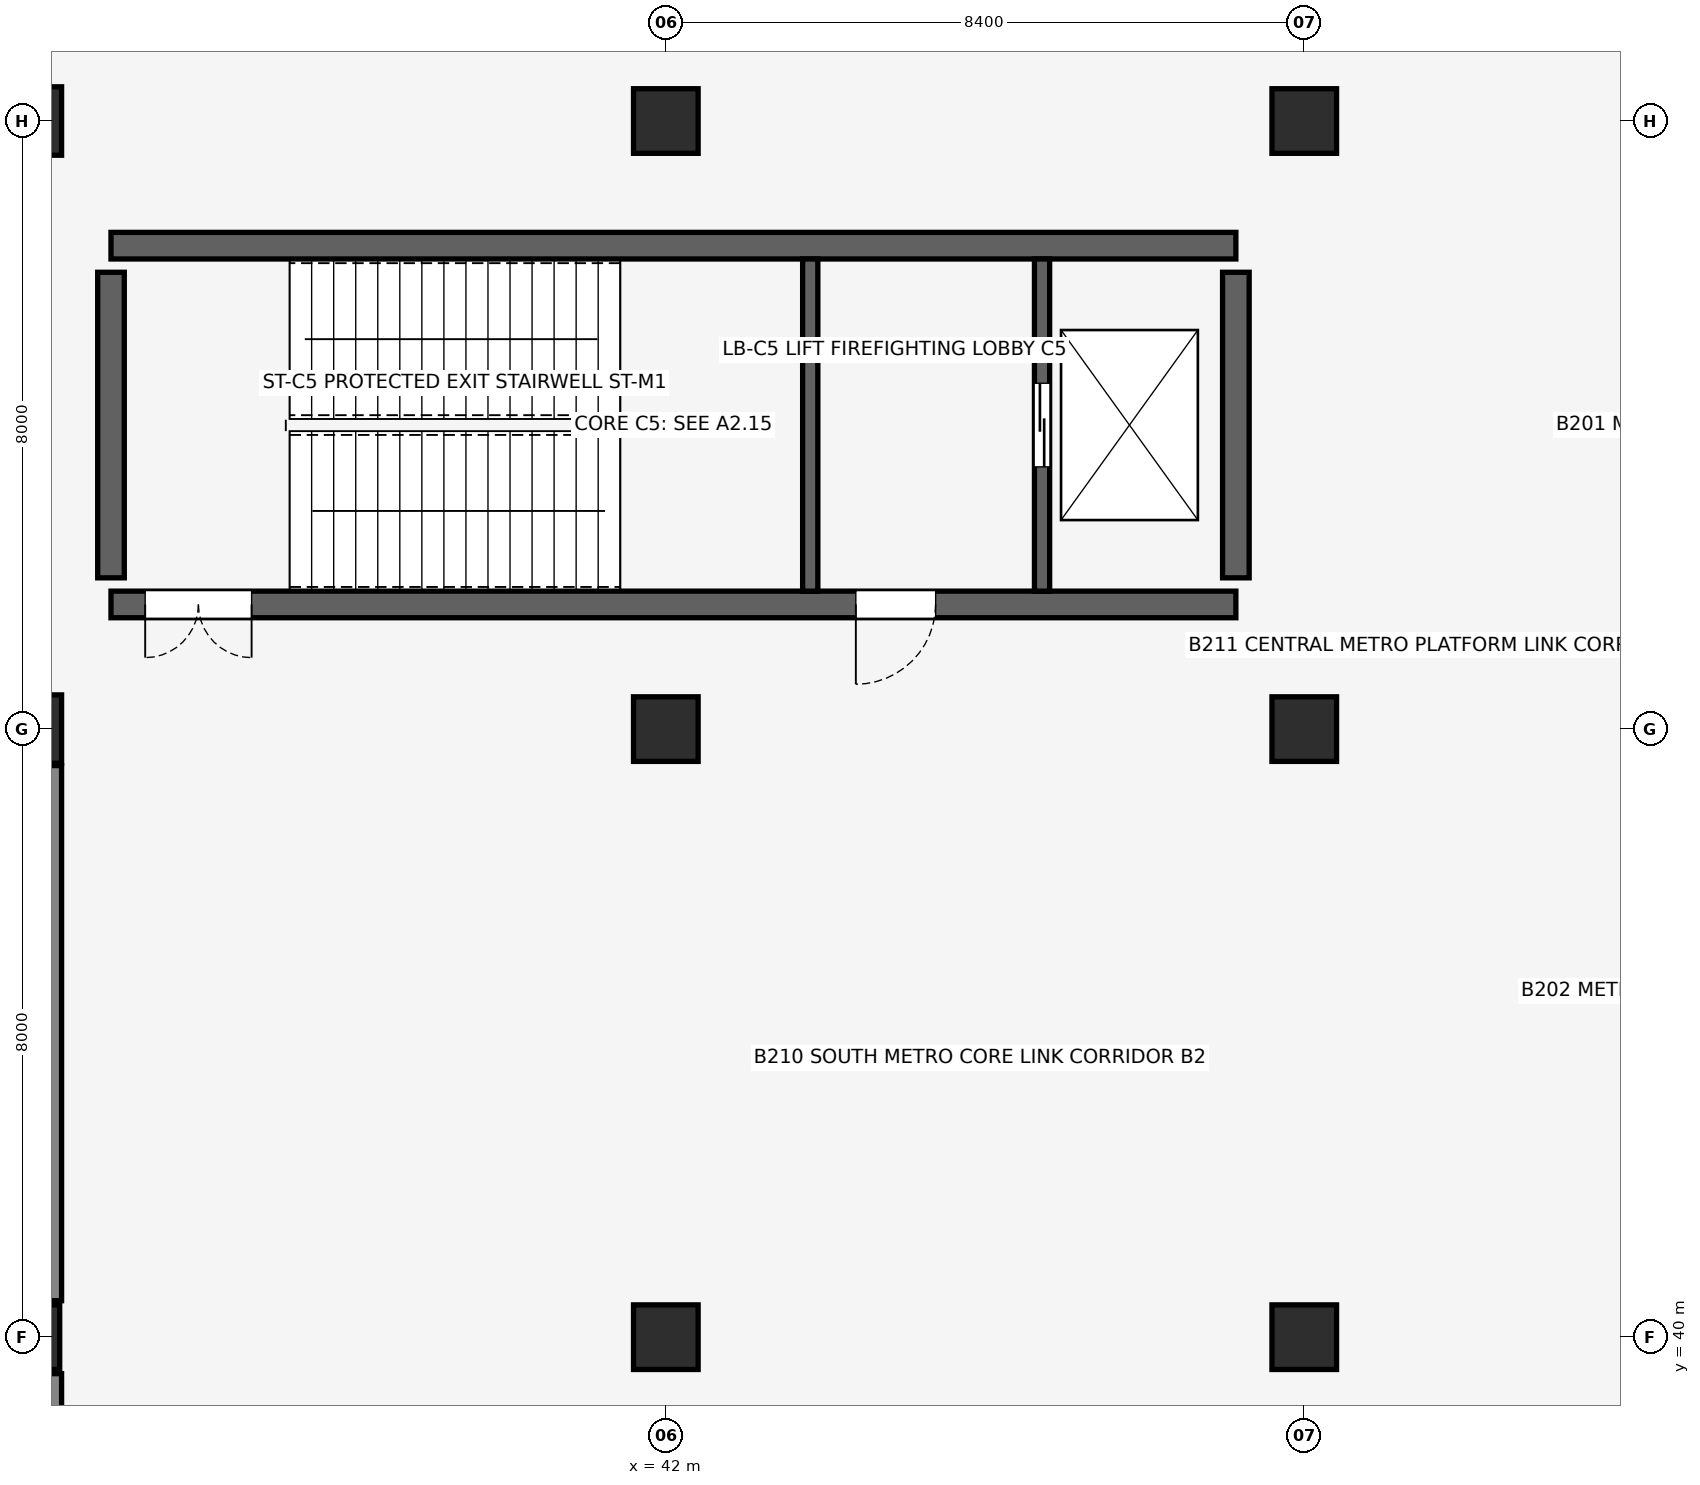
"""IFC4 building model, lengths in metres.
Left out: names, types, materials, properties, quantities, classifications, styles, units other than length and angle.
Written with IfcOpenShell. Run it as: python <this file> out.ifc"""

import sys

from ifc_helpers import new_model, si_unit, direction, frame, frame_2d, origin, origin_2d, place, context, subcontext, project, spatial, rectangle, extrude, element, fill, save


model = new_model("IFC4")
c1 = context("Model", 3, precision=1e-05, world=origin(), true_north=direction((0.0, 1.0)))
c2 = subcontext(c1, "Body", "Model", "MODEL_VIEW")
j1 = project(units=[si_unit("LENGTHUNIT", "METRE"), si_unit("PLANEANGLEUNIT", "RADIAN")], contexts=[c1])
p1 = place(None, origin())
s1 = spatial("IfcSite", under=j1, at=p1, CompositionType="ELEMENT")
p2 = place(p1, origin())
s2 = spatial("IfcBuilding", under=s1, at=p2, CompositionType="ELEMENT")
p3 = place(p2, frame((0.0, 0.0, -10.88)))
s3 = spatial("IfcBuildingStorey", under=s2, at=p3, CompositionType="ELEMENT", Elevation=-10.88)
for number, where, z_axis, x_axis in (
    (1, (33.6, 32.48, 0.0), (0.0, 0.0, 1.0), (0.0, 1.0, 0.0)),
    (2, (33.6, 40.48, 0.0), (0.0, 0.0, 1.0), (0.0, 1.0, 0.0)),
):
    element("IfcWall", number, at=place(p3, frame(where, z_axis=z_axis, x_axis=x_axis)), inside=s3, PredefinedType="SHEAR", context=c2, shape_type="SweptSolid", body=[
        extrude(rectangle(XDim=7.04, YDim=0.9, at=frame_2d((3.52, 0.0))), origin(), (0.0, 0.0, 1.0), 5.04),
    ])
p4 = place(p3, frame((34.7, 49.64, 0.0), z_axis=(0.0, 0.0, 1.0), x_axis=(1.0, 0.0, 0.0)))
e3 = element("IfcWall", 3, at=p4, inside=s3, PredefinedType="SHEAR", context=c2, shape_type="SweptSolid", body=[
    extrude(rectangle(XDim=14.8, YDim=0.35, at=frame_2d((7.4, 0.0))), origin(), (0.0, 0.0, 1.0), 5.04),
])
p5 = place(p4, frame((1.85, 0.0, 0.0), z_axis=(0.0, 0.0, 1.0), x_axis=(-1.0, 0.0, 0.0)))
e4 = element("IfcOpeningElement", 4, at=p5, cuts=e3, PredefinedType="OPENING", context=c2, shape_type="SweptSolid", body=[
    extrude(rectangle(XDim=1.4, YDim=2.15, at=frame_2d((0.7, 1.075))), frame((0.0, 0.185, 0.0), z_axis=(0.0, -1.0, 0.0), x_axis=(1.0, 0.0, 0.0)), (0.0, 0.0, 1.0), 0.37),
])
p6 = place(p4, frame((10.85, 0.0, 0.0), z_axis=(0.0, 0.0, 1.0), x_axis=(-1.0, 0.0, 0.0)))
e5 = element("IfcOpeningElement", 5, at=p6, cuts=e3, PredefinedType="OPENING", context=c2, shape_type="SweptSolid", body=[
    extrude(rectangle(XDim=1.05, YDim=2.15, at=frame_2d((0.525, 1.075))), frame((0.0, 0.185, 0.0), z_axis=(0.0, -1.0, 0.0), x_axis=(1.0, 0.0, 0.0)), (0.0, 0.0, 1.0), 0.37),
])
p7 = place(p3, frame((34.7, 54.36, 0.0), z_axis=(0.0, 0.0, 1.0), x_axis=(1.0, 0.0, 0.0)))
e6 = element("IfcWall", 6, at=p7, inside=s3, PredefinedType="SHEAR", context=c2, shape_type="SweptSolid", body=[
    extrude(rectangle(XDim=14.8, YDim=0.35, at=frame_2d((7.4, 0.0))), origin(), (0.0, 0.0, 1.0), 5.04),
])
for number, where, z_axis, x_axis in (
    (7, (34.7, 49.99, 0.0), (0.0, 0.0, 1.0), (0.0, 1.0, 0.0)),
    (8, (49.5, 49.99, 0.0), (0.0, 0.0, 1.0), (0.0, 1.0, 0.0)),
):
    element("IfcWall", number, at=place(p3, frame(where, z_axis=z_axis, x_axis=x_axis)), inside=s3, PredefinedType="SHEAR", context=c2, shape_type="SweptSolid", body=[
        extrude(rectangle(XDim=4.02, YDim=0.35, at=frame_2d((2.01, 0.0))), origin(), (0.0, 0.0, 1.0), 5.04),
    ])
p8 = place(p3, frame((33.6, 40.0, 0.0), z_axis=(0.0, 0.0, 1.0), x_axis=(1.0, 0.0, 0.0)))
e9 = element("IfcColumn", 9, at=p8, inside=s3, PredefinedType="COLUMN", context=c2, shape_type="SweptSolid", body=[
    extrude(rectangle(XDim=0.85, YDim=0.85, at=origin_2d()), origin(), (0.0, 0.0, 1.0), 5.04),
])
for number, where, z_axis, x_axis in (
    (10, (33.6, 48.0, 0.0), (0.0, 0.0, 1.0), (1.0, 0.0, 0.0)),
    (11, (33.6, 56.0, 0.0), (0.0, 0.0, 1.0), (1.0, 0.0, 0.0)),
):
    element("IfcColumn", number, at=place(p3, frame(where, z_axis=z_axis, x_axis=x_axis)), inside=s3, PredefinedType="COLUMN", context=c2, shape_type="SweptSolid", body=[
        extrude(rectangle(XDim=0.9, YDim=0.9, at=origin_2d()), origin(), (0.0, 0.0, 1.0), 5.04),
    ])
for number, where, z_axis, x_axis in (
    (12, (42.0, 40.0, 0.0), (0.0, 0.0, 1.0), (1.0, 0.0, 0.0)),
    (13, (42.0, 48.0, 0.0), (0.0, 0.0, 1.0), (1.0, 0.0, 0.0)),
    (14, (42.0, 56.0, 0.0), (0.0, 0.0, 1.0), (1.0, 0.0, 0.0)),
    (15, (50.4, 40.0, 0.0), (0.0, 0.0, 1.0), (1.0, 0.0, 0.0)),
    (16, (50.4, 48.0, 0.0), (0.0, 0.0, 1.0), (1.0, 0.0, 0.0)),
    (17, (50.4, 56.0, 0.0), (0.0, 0.0, 1.0), (1.0, 0.0, 0.0)),
):
    element("IfcColumn", number, at=place(p3, frame(where, z_axis=z_axis, x_axis=x_axis)), inside=s3, PredefinedType="COLUMN", context=c2, shape_type="SweptSolid", body=[
        extrude(rectangle(XDim=0.85, YDim=0.85, at=origin_2d()), origin(), (0.0, 0.0, 1.0), 5.04),
    ])
p9 = place(p3, frame((43.9, 49.815, 0.0), z_axis=(0.0, 0.0, 1.0), x_axis=(0.0, 1.0, 0.0)))
e18 = element("IfcWall", 18, at=p9, inside=s3, PredefinedType="SHEAR", context=c2, shape_type="SweptSolid", body=[
    extrude(rectangle(XDim=4.37, YDim=0.2, at=frame_2d((2.185, 0.0))), origin(), (0.0, 0.0, 1.0), 5.04),
])
p10 = place(p3, frame((46.95, 49.815, 0.0), z_axis=(0.0, 0.0, 1.0), x_axis=(0.0, 1.0, 0.0)))
e19 = element("IfcWall", 19, at=p10, inside=s3, PredefinedType="SHEAR", context=c2, shape_type="SweptSolid", body=[
    extrude(rectangle(XDim=4.37, YDim=0.2, at=frame_2d((2.185, 0.0))), origin(), (0.0, 0.0, 1.0), 5.04),
])
p11 = place(p10, frame((1.635, 0.0, 0.0), z_axis=(0.0, 0.0, 1.0), x_axis=(1.0, 0.0, 0.0)))
e20 = element("IfcOpeningElement", 20, at=p11, cuts=e19, PredefinedType="OPENING", context=c2, shape_type="SweptSolid", body=[
    extrude(rectangle(XDim=1.1, YDim=2.15, at=frame_2d((0.55, 1.075))), frame((0.0, 0.11, 0.0), z_axis=(0.0, -1.0, 0.0), x_axis=(1.0, 0.0, 0.0)), (0.0, 0.0, 1.0), 0.22),
])
p12 = place(p5, origin())
e21 = element("IfcDoor", 21, at=p12, inside=s3, OperationType="DOUBLE_DOOR_SINGLE_SWING", PredefinedType="DOOR", context=c2, shape_type="SweptSolid", body=[
    extrude(rectangle(XDim=1.4, YDim=2.15, at=frame_2d((0.7, 1.075))), frame((0.0, 0.025, 0.0), z_axis=(0.0, -1.0, 0.0), x_axis=(1.0, 0.0, 0.0)), (0.0, 0.0, 1.0), 0.05),
])
fill(e4, e21)
p13 = place(p6, origin())
e22 = element("IfcDoor", 22, at=p13, inside=s3, OperationType="SINGLE_SWING_RIGHT", PredefinedType="DOOR", context=c2, shape_type="SweptSolid", body=[
    extrude(rectangle(XDim=1.05, YDim=2.15, at=frame_2d((0.525, 1.075))), frame((0.0, 0.025, 0.0), z_axis=(0.0, -1.0, 0.0), x_axis=(1.0, 0.0, 0.0)), (0.0, 0.0, 1.0), 0.05),
])
fill(e5, e22)
p14 = place(p11, origin())
e23 = element("IfcDoor", 23, at=p14, inside=s3, OperationType="DOUBLE_DOOR_SLIDING", PredefinedType="DOOR", context=c2, shape_type="SweptSolid", body=[
    extrude(rectangle(XDim=1.1, YDim=2.15, at=frame_2d((0.55, 1.075))), frame((0.0, 0.025, 0.0), z_axis=(0.0, -1.0, 0.0), x_axis=(1.0, 0.0, 0.0)), (0.0, 0.0, 1.0), 0.05),
])
fill(e20, e23)
save(model, sys.argv[1])
